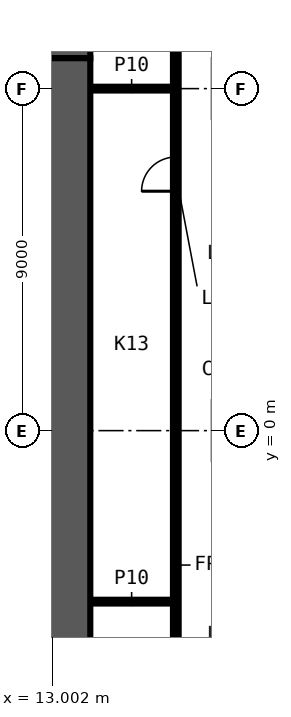
"""IFC4 building model, lengths in metres.
Left out: names, types, materials, properties, quantities, classifications, styles, units other than length and angle.
Written with IfcOpenShell. Run it as: python <this file> out.ifc"""

import sys

from ifc_helpers import new_model, si_unit, direction, frame, frame_2d, origin, place, context, subcontext, project, spatial, rectangle, extrude, element, fill, save


model = new_model("IFC4")
c1 = context("Model", 3, precision=1e-05, world=origin(), true_north=direction((0.0, 1.0)))
c2 = subcontext(c1, "Body", "Model", "MODEL_VIEW")
j1 = project(units=[si_unit("LENGTHUNIT", "METRE"), si_unit("PLANEANGLEUNIT", "RADIAN")], contexts=[c1])
p1 = place(None, origin())
s1 = spatial("IfcSite", under=j1, at=p1, CompositionType="ELEMENT")
p2 = place(p1, origin())
s2 = spatial("IfcBuilding", under=s1, at=p2, CompositionType="ELEMENT")
p3 = place(p2, frame((0.0, 0.0, 55.1)))
s3 = spatial("IfcBuildingStorey", under=s2, at=p3, CompositionType="ELEMENT", Elevation=55.1)
for number, where, z_axis, x_axis in (
    (1, (14.0, -4.5, 0.0), (0.0, 0.0, 1.0), (1.0, 0.0, 0.0)),
    (2, (14.0, 9.0, 0.0), (0.0, 0.0, 1.0), (1.0, 0.0, 0.0)),
):
    element("IfcWall", number, at=place(p3, frame(where, z_axis=z_axis, x_axis=x_axis)), inside=s3, PredefinedType="PARTITIONING", context=c2, shape_type="SweptSolid", body=[
        extrude(rectangle(XDim=2.175, YDim=0.1, at=frame_2d((1.087, 0.0))), origin(), (0.0, 0.0, 1.0), 3.3),
    ])
p4 = place(p3, frame((16.25, -13.175, 0.0), z_axis=(0.0, 0.0, 1.0), x_axis=(0.0, 1.0, 0.0)))
e3 = element("IfcWall", 3, at=p4, inside=s3, PredefinedType="PARTITIONING", context=c2, shape_type="SweptSolid", body=[
    extrude(rectangle(XDim=26.35, YDim=0.15, at=frame_2d((13.175, 0.0))), origin(), (0.0, 0.0, 1.0), 3.3),
])
p5 = place(p4, frame((19.475, 0.0, 0.0)))
e4 = element("IfcOpeningElement", 4, at=p5, cuts=e3, PredefinedType="OPENING", context=c2, shape_type="SweptSolid", body=[
    extrude(rectangle(XDim=0.9, YDim=2.1, at=frame_2d((0.45, 1.05))), frame((0.0, 0.085, 0.0), z_axis=(0.0, -1.0, 0.0), x_axis=(1.0, 0.0, 0.0)), (0.0, 0.0, 1.0), 0.17),
])
p6 = place(p3, frame((-14.0, 10.4, 0.0), z_axis=(0.0, 0.0, 1.0), x_axis=(1.0, 0.0, 0.0)))
e5 = element("IfcWall", 5, at=p6, inside=s3, PredefinedType="SHEAR", context=c2, shape_type="SweptSolid", body=[
    extrude(rectangle(XDim=28.0, YDim=1.2, at=frame_2d((14.0, 0.0))), origin(), (0.0, 0.0, 1.0), 3.3),
])
p7 = place(p6, frame((15.9, 0.0, 0.0)))
e6 = element("IfcOpeningElement", 6, at=p7, cuts=e5, PredefinedType="OPENING", context=c2, shape_type="SweptSolid", body=[
    extrude(rectangle(XDim=1.6, YDim=2.1, at=frame_2d((0.8, 1.05))), frame((0.0, 0.61, 0.0), z_axis=(0.0, -1.0, 0.0), x_axis=(1.0, 0.0, 0.0)), (0.0, 0.0, 1.0), 1.22),
])
p8 = place(p3, frame((13.4, 9.8, 0.0), z_axis=(0.0, 0.0, 1.0), x_axis=(0.0, -1.0, 0.0)))
e7 = element("IfcWall", 7, at=p8, inside=s3, PredefinedType="SHEAR", context=c2, shape_type="SweptSolid", body=[
    extrude(rectangle(XDim=19.6, YDim=1.2, at=frame_2d((9.8, 0.0))), origin(), (0.0, 0.0, 1.0), 3.3),
])
p9 = place(p5, origin())
e8 = element("IfcDoor", 8, at=p9, inside=s3, OperationType="SINGLE_SWING_RIGHT", PredefinedType="DOOR", context=c2, shape_type="SweptSolid", body=[
    extrude(rectangle(XDim=0.9, YDim=2.1, at=frame_2d((0.45, 1.05))), frame((0.0, 0.025, 0.0), z_axis=(0.0, -1.0, 0.0), x_axis=(1.0, 0.0, 0.0)), (0.0, 0.0, 1.0), 0.05),
])
fill(e4, e8)
save(model, sys.argv[1])
